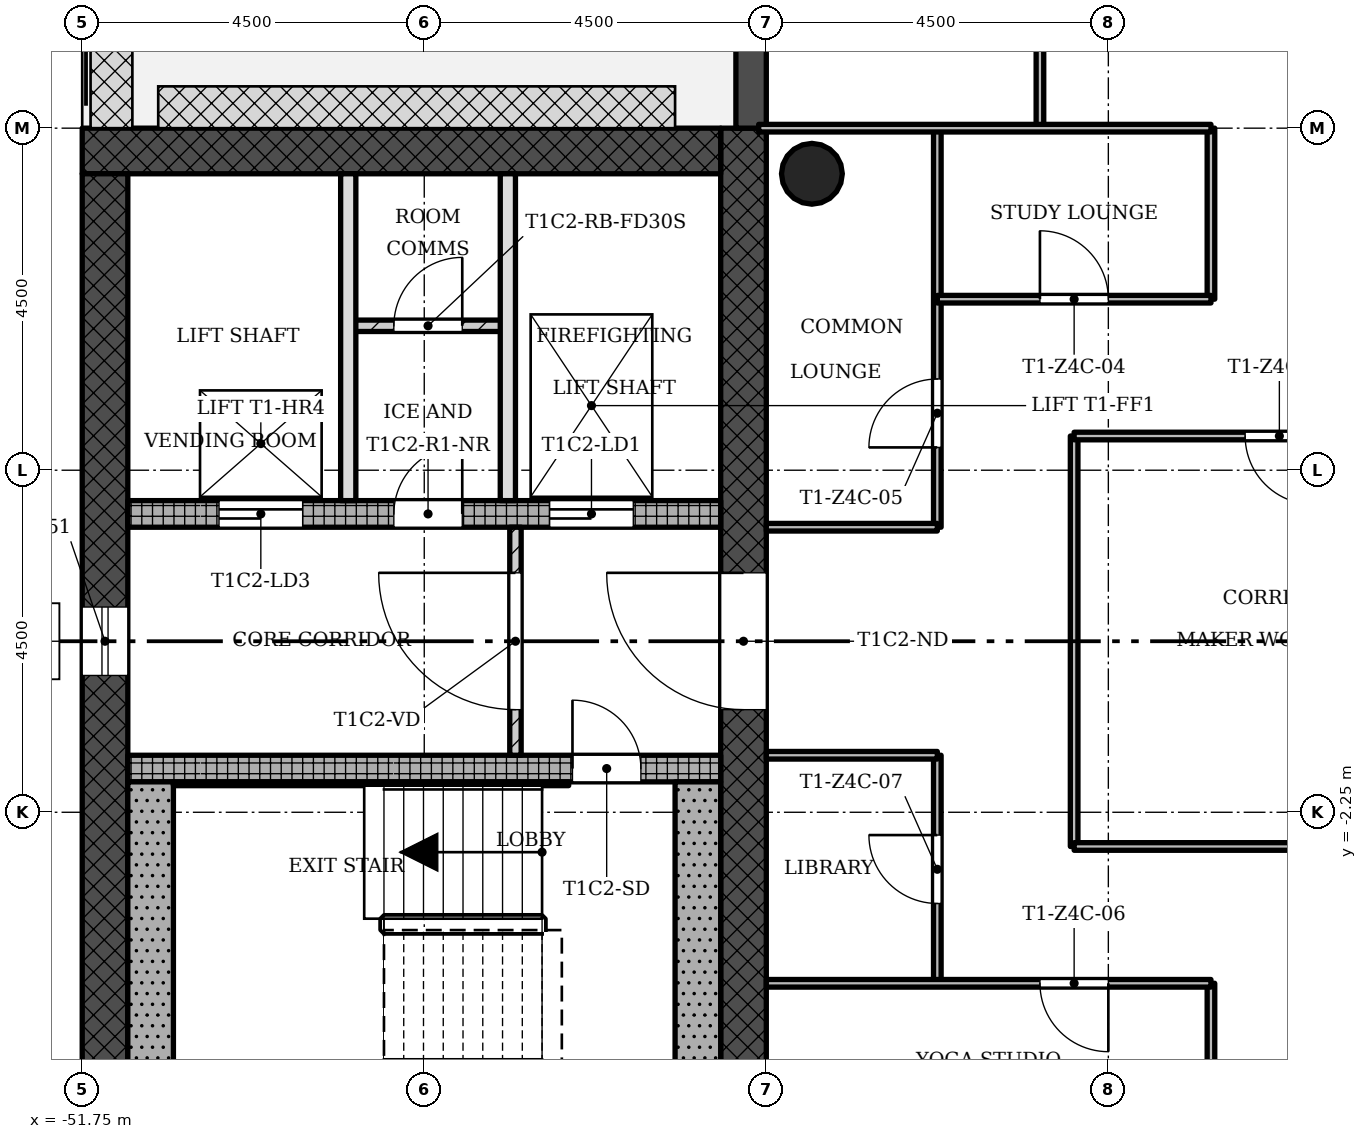
"""IFC4 building model, lengths in metres.
Left out: names, types, materials, properties, quantities, classifications, styles, units other than length and angle.
Written with IfcOpenShell. Run it as: python <this file> out.ifc"""

import sys

from ifc_helpers import new_model, si_unit, direction, frame, frame_2d, origin, origin_2d, place, context, subcontext, project, spatial, rectangle, hollow_circle, extrude, element, fill, save


model = new_model("IFC4")
c1 = context("Model", 3, precision=1e-05, world=origin(), true_north=direction((0.0, 1.0)))
c2 = subcontext(c1, "Body", "Model", "MODEL_VIEW")
j1 = project(units=[si_unit("LENGTHUNIT", "METRE"), si_unit("PLANEANGLEUNIT", "RADIAN")], contexts=[c1])
p1 = place(None, origin())
s1 = spatial("IfcSite", under=j1, at=p1, CompositionType="ELEMENT")
p2 = place(p1, origin())
s2 = spatial("IfcBuilding", under=s1, at=p2, CompositionType="ELEMENT")
p3 = place(p2, frame((0.0, 0.0, 185.8)))
s3 = spatial("IfcBuildingStorey", under=s2, at=p3, CompositionType="ELEMENT", Elevation=185.8)
p4 = place(p3, frame((-43.05, -6.15, 0.0), z_axis=(0.0, 0.0, 1.0), x_axis=(0.0, 1.0, 0.0)))
e1 = element("IfcWall", 1, at=p4, inside=s3, PredefinedType="SHEAR", context=c2, shape_type="SweptSolid", body=[
    extrude(rectangle(XDim=12.9, YDim=0.6, at=frame_2d((6.45, 0.0))), origin(), (0.0, 0.0, 1.0), 3.4),
])
p5 = place(p4, frame((5.25, 0.0, 0.0)))
e2 = element("IfcOpeningElement", 2, at=p5, cuts=e1, PredefinedType="OPENING", context=c2, shape_type="SweptSolid", body=[
    extrude(rectangle(XDim=1.8, YDim=2.1, at=frame_2d((0.9, 1.05))), frame((0.0, 0.31, 0.0), z_axis=(0.0, -1.0, 0.0), x_axis=(1.0, 0.0, 0.0)), (0.0, 0.0, 1.0), 0.62),
])
p6 = place(p3, frame((-43.35, 6.45, 0.0), z_axis=(0.0, 0.0, 1.0), x_axis=(-1.0, 0.0, 0.0)))
e3 = element("IfcWall", 3, at=p6, inside=s3, PredefinedType="SHEAR", context=c2, shape_type="SweptSolid", body=[
    extrude(rectangle(XDim=8.4, YDim=0.6, at=frame_2d((4.2, 0.0))), origin(), (0.0, 0.0, 1.0), 3.4),
])
p7 = place(p3, frame((-51.45, 6.15, 0.0), z_axis=(0.0, 0.0, 1.0), x_axis=(0.0, -1.0, 0.0)))
e4 = element("IfcWall", 4, at=p7, inside=s3, PredefinedType="SHEAR", context=c2, shape_type="SweptSolid", body=[
    extrude(rectangle(XDim=12.9, YDim=0.6, at=frame_2d((6.45, 0.0))), origin(), (0.0, 0.0, 1.0), 3.4),
])
p8 = place(p7, frame((5.7, 0.0, 0.45)))
e5 = element("IfcOpeningElement", 5, at=p8, cuts=e4, PredefinedType="OPENING", context=c2, shape_type="SweptSolid", body=[
    extrude(rectangle(XDim=0.9, YDim=2.4, at=frame_2d((0.45, 1.2))), frame((0.0, 0.31, 0.0), z_axis=(0.0, -1.0, 0.0), x_axis=(1.0, 0.0, 0.0)), (0.0, 0.0, 1.0), 0.62),
])
p9 = place(p3, frame((-51.15, -1.675, 0.0), z_axis=(0.0, 0.0, 1.0), x_axis=(1.0, 0.0, 0.0)))
e6 = element("IfcWall", 6, at=p9, inside=s3, PredefinedType="SHEAR", context=c2, shape_type="SweptSolid", body=[
    extrude(rectangle(XDim=7.8, YDim=0.35, at=frame_2d((3.9, 0.0))), origin(), (0.0, 0.0, 1.0), 3.4),
])
p10 = place(p9, frame((5.85, 0.0, 0.0)))
e7 = element("IfcOpeningElement", 7, at=p10, cuts=e6, PredefinedType="OPENING", context=c2, shape_type="SweptSolid", body=[
    extrude(rectangle(XDim=0.9, YDim=2.1, at=frame_2d((0.45, 1.05))), frame((0.0, 0.185, 0.0), z_axis=(0.0, -1.0, 0.0), x_axis=(1.0, 0.0, 0.0)), (0.0, 0.0, 1.0), 0.37),
])
p11 = place(p3, frame((-51.15, 1.675, 0.0), z_axis=(0.0, 0.0, 1.0), x_axis=(1.0, 0.0, 0.0)))
e8 = element("IfcWall", 8, at=p11, inside=s3, PredefinedType="SHEAR", context=c2, shape_type="SweptSolid", body=[
    extrude(rectangle(XDim=7.8, YDim=0.35, at=frame_2d((3.9, 0.0))), origin(), (0.0, 0.0, 1.0), 3.4),
])
p12 = place(p11, frame((5.55, 0.0, 0.0)))
e9 = element("IfcOpeningElement", 9, at=p12, cuts=e8, PredefinedType="OPENING", context=c2, shape_type="SweptSolid", body=[
    extrude(rectangle(XDim=1.1, YDim=2.1, at=frame_2d((0.55, 1.05))), frame((0.0, 0.185, 0.0), z_axis=(0.0, -1.0, 0.0), x_axis=(1.0, 0.0, 0.0)), (0.0, 0.0, 1.0), 0.37),
])
p13 = place(p11, frame((1.2, 0.0, 0.0)))
e10 = element("IfcOpeningElement", 10, at=p13, cuts=e8, PredefinedType="OPENING", context=c2, shape_type="SweptSolid", body=[
    extrude(rectangle(XDim=1.1, YDim=2.1, at=frame_2d((0.55, 1.05))), frame((0.0, 0.185, 0.0), z_axis=(0.0, -1.0, 0.0), x_axis=(1.0, 0.0, 0.0)), (0.0, 0.0, 1.0), 0.37),
])
p14 = place(p11, frame((3.5, 0.0, 0.0)))
e11 = element("IfcOpeningElement", 11, at=p14, cuts=e8, PredefinedType="OPENING", context=c2, shape_type="SweptSolid", body=[
    extrude(rectangle(XDim=0.9, YDim=2.1, at=frame_2d((0.45, 1.05))), frame((0.0, 0.185, 0.0), z_axis=(0.0, -1.0, 0.0), x_axis=(1.0, 0.0, 0.0)), (0.0, 0.0, 1.0), 0.37),
])
p15 = place(p3, frame((-42.15, 6.15, 0.0), z_axis=(0.0, 0.0, 1.0), x_axis=(1.0, 0.0, 0.0)))
e12 = element("IfcColumn", 12, at=p15, inside=s3, PredefinedType="COLUMN", context=c2, shape_type="SweptSolid", body=[
    extrude(hollow_circle(Radius=0.4, WallThickness=0.028, at=origin_2d()), origin(), (0.0, 0.0, 1.0), 3.4),
])
p16 = place(p3, frame((-42.95, 11.25, -0.02), z_axis=(0.0, 0.0, 1.0), x_axis=(0.0, -1.0, 0.0)))
e13 = element("IfcWall", 13, at=p16, inside=s3, PredefinedType="STANDARD", context=c2, shape_type="SweptSolid", body=[
    extrude(rectangle(XDim=4.5, YDim=0.4, at=frame_2d((2.25, 0.0))), origin(), (0.0, 0.0, 1.0), 3.12),
])
p17 = place(p16, frame((1.35, 0.0, 0.02)))
e14 = element("IfcOpeningElement", 14, at=p17, cuts=e13, PredefinedType="OPENING", context=c2, shape_type="SweptSolid", body=[
    extrude(rectangle(XDim=1.8, YDim=2.1, at=frame_2d((0.9, 1.05))), frame((0.0, 0.21, 0.0), z_axis=(0.0, -1.0, 0.0), x_axis=(1.0, 0.0, 0.0)), (0.0, 0.0, 1.0), 0.42),
])
p18 = place(p3, frame((-46.05, 1.5, 0.0), z_axis=(0.0, 0.0, 1.0), x_axis=(0.0, -1.0, 0.0)))
e15 = element("IfcWall", 15, at=p18, inside=s3, PredefinedType="PARTITIONING", context=c2, shape_type="SweptSolid", body=[
    extrude(rectangle(XDim=3.0, YDim=0.15, at=frame_2d((1.5, 0.0))), origin(), (0.0, 0.0, 1.0), 3.0),
])
p19 = place(p18, frame((0.6, 0.0, 0.0)))
e16 = element("IfcOpeningElement", 16, at=p19, cuts=e15, PredefinedType="OPENING", context=c2, shape_type="SweptSolid", body=[
    extrude(rectangle(XDim=1.8, YDim=2.1, at=frame_2d((0.9, 1.05))), frame((0.0, 0.085, 0.0), z_axis=(0.0, -1.0, 0.0), x_axis=(1.0, 0.0, 0.0)), (0.0, 0.0, 1.0), 0.17),
])
for number, where, z_axis, x_axis in (
    (17, (-48.25, 6.15, 0.0), (0.0, 0.0, 1.0), (0.0, -1.0, 0.0)),
    (18, (-46.15, 6.15, 0.0), (0.0, 0.0, 1.0), (0.0, -1.0, 0.0)),
):
    element("IfcWall", number, at=place(p3, frame(where, z_axis=z_axis, x_axis=x_axis)), inside=s3, PredefinedType="SOLIDWALL", context=c2, shape_type="SweptSolid", body=[
        extrude(rectangle(XDim=4.3, YDim=0.2, at=frame_2d((2.15, 0.0))), origin(), (0.0, 0.0, 1.0), 3.0),
    ])
p20 = place(p3, frame((-46.15, 4.15, 0.0), z_axis=(0.0, 0.0, 1.0), x_axis=(-1.0, 0.0, 0.0)))
e19 = element("IfcWall", 19, at=p20, inside=s3, PredefinedType="PARTITIONING", context=c2, shape_type="SweptSolid", body=[
    extrude(rectangle(XDim=2.1, YDim=0.15, at=frame_2d((1.05, 0.0))), origin(), (0.0, 0.0, 1.0), 3.0),
])
p21 = place(p20, frame((0.6, 0.0, 0.0)))
e20 = element("IfcOpeningElement", 20, at=p21, cuts=e19, PredefinedType="OPENING", context=c2, shape_type="SweptSolid", body=[
    extrude(rectangle(XDim=0.9, YDim=2.1, at=frame_2d((0.45, 1.05))), frame((0.0, 0.085, 0.0), z_axis=(0.0, -1.0, 0.0), x_axis=(1.0, 0.0, 0.0)), (0.0, 0.0, 1.0), 0.17),
])
p22 = place(p3, frame((-40.5, -4.5, 0.0), z_axis=(0.0, 0.0, 1.0), x_axis=(0.0, 1.0, 0.0)))
e21 = element("IfcWall", 21, at=p22, inside=s3, PredefinedType="PARTITIONING", context=c2, shape_type="SweptSolid", body=[
    extrude(rectangle(XDim=3.0, YDim=0.1, at=frame_2d((1.5, 0.0))), origin(), (0.0, 0.0, 1.0), 3.0),
])
p23 = place(p22, frame((1.05, 0.0, 0.0)))
e22 = element("IfcOpeningElement", 22, at=p23, cuts=e21, PredefinedType="OPENING", context=c2, shape_type="SweptSolid", body=[
    extrude(rectangle(XDim=0.9, YDim=2.1, at=frame_2d((0.45, 1.05))), frame((0.0, 0.06, 0.0), z_axis=(0.0, -1.0, 0.0), x_axis=(1.0, 0.0, 0.0)), (0.0, 0.0, 1.0), 0.12),
])
p24 = place(p3, frame((-40.5, 1.5, 0.0), z_axis=(0.0, 0.0, 1.0), x_axis=(0.0, 1.0, 0.0)))
e23 = element("IfcWall", 23, at=p24, inside=s3, PredefinedType="PARTITIONING", context=c2, shape_type="SweptSolid", body=[
    extrude(rectangle(XDim=5.25, YDim=0.1, at=frame_2d((2.625, 0.0))), origin(), (0.0, 0.0, 1.0), 3.0),
])
p25 = place(p24, frame((1.05, 0.0, 0.0)))
e24 = element("IfcOpeningElement", 24, at=p25, cuts=e23, PredefinedType="OPENING", context=c2, shape_type="SweptSolid", body=[
    extrude(rectangle(XDim=0.9, YDim=2.1, at=frame_2d((0.45, 1.05))), frame((0.0, 0.06, 0.0), z_axis=(0.0, -1.0, 0.0), x_axis=(1.0, 0.0, 0.0)), (0.0, 0.0, 1.0), 0.12),
])
p26 = place(p3, frame((-39.15, 6.75, 0.0), z_axis=(0.0, 0.0, 1.0), x_axis=(0.0, 1.0, 0.0)))
e25 = element("IfcWall", 25, at=p26, inside=s3, PredefinedType="PARTITIONING", context=c2, shape_type="SweptSolid", body=[
    extrude(rectangle(XDim=4.5, YDim=0.1, at=frame_2d((2.25, 0.0))), origin(), (0.0, 0.0, 1.0), 3.0),
])
p27 = place(p26, frame((1.8, 0.0, 0.0)))
e26 = element("IfcOpeningElement", 26, at=p27, cuts=e25, PredefinedType="OPENING", context=c2, shape_type="SweptSolid", body=[
    extrude(rectangle(XDim=0.9, YDim=2.1, at=frame_2d((0.45, 1.05))), frame((0.0, 0.06, 0.0), z_axis=(0.0, -1.0, 0.0), x_axis=(1.0, 0.0, 0.0)), (0.0, 0.0, 1.0), 0.12),
])
p28 = place(p3, frame((-38.7, -2.7, 0.0), z_axis=(0.0, 0.0, 1.0), x_axis=(0.0, 1.0, 0.0)))
e27 = element("IfcWall", 27, at=p28, inside=s3, PredefinedType="PARTITIONING", context=c2, shape_type="SweptSolid", body=[
    extrude(rectangle(XDim=5.4, YDim=0.1, at=frame_2d((2.7, 0.0))), origin(), (0.0, 0.0, 1.0), 3.0),
])
p29 = place(p3, frame((-36.9, -11.25, 0.0), z_axis=(0.0, 0.0, 1.0), x_axis=(0.0, 1.0, 0.0)))
e28 = element("IfcWall", 28, at=p29, inside=s3, PredefinedType="PARTITIONING", context=c2, shape_type="SweptSolid", body=[
    extrude(rectangle(XDim=6.75, YDim=0.1, at=frame_2d((3.375, 0.0))), origin(), (0.0, 0.0, 1.0), 3.0),
])
p30 = place(p29, frame((1.8, 0.0, 0.0)))
e29 = element("IfcOpeningElement", 29, at=p30, cuts=e28, PredefinedType="OPENING", context=c2, shape_type="SweptSolid", body=[
    extrude(rectangle(XDim=0.9, YDim=2.1, at=frame_2d((0.45, 1.05))), frame((0.0, 0.06, 0.0), z_axis=(0.0, -1.0, 0.0), x_axis=(1.0, 0.0, 0.0)), (0.0, 0.0, 1.0), 0.12),
])
p31 = place(p3, frame((-36.9, 4.5, 0.0), z_axis=(0.0, 0.0, 1.0), x_axis=(0.0, 1.0, 0.0)))
e30 = element("IfcWall", 30, at=p31, inside=s3, PredefinedType="PARTITIONING", context=c2, shape_type="SweptSolid", body=[
    extrude(rectangle(XDim=2.25, YDim=0.1, at=frame_2d((1.125, 0.0))), origin(), (0.0, 0.0, 1.0), 3.0),
])
p32 = place(p3, frame((-42.75, -4.5, 0.0), z_axis=(0.0, 0.0, 1.0), x_axis=(1.0, 0.0, 0.0)))
e31 = element("IfcWall", 31, at=p32, inside=s3, PredefinedType="PARTITIONING", context=c2, shape_type="SweptSolid", body=[
    extrude(rectangle(XDim=5.85, YDim=0.1, at=frame_2d((2.925, 0.0))), origin(), (0.0, 0.0, 1.0), 3.0),
])
p33 = place(p32, frame((3.6, 0.0, 0.0)))
e32 = element("IfcOpeningElement", 32, at=p33, cuts=e31, PredefinedType="OPENING", context=c2, shape_type="SweptSolid", body=[
    extrude(rectangle(XDim=0.9, YDim=2.1, at=frame_2d((0.45, 1.05))), frame((0.0, 0.06, 0.0), z_axis=(0.0, -1.0, 0.0), x_axis=(1.0, 0.0, 0.0)), (0.0, 0.0, 1.0), 0.12),
])
p34 = place(p3, frame((-38.7, -2.7, 0.0), z_axis=(0.0, 0.0, 1.0), x_axis=(1.0, 0.0, 0.0)))
e33 = element("IfcWall", 33, at=p34, inside=s3, PredefinedType="PARTITIONING", context=c2, shape_type="SweptSolid", body=[
    extrude(rectangle(XDim=5.4, YDim=0.1, at=frame_2d((2.7, 0.0))), origin(), (0.0, 0.0, 1.0), 3.0),
])
for number, where, z_axis, x_axis in (
    (34, (-42.75, -1.5, 0.0), (0.0, 0.0, 1.0), (1.0, 0.0, 0.0)),
    (35, (-42.75, 1.5, 0.0), (0.0, 0.0, 1.0), (1.0, 0.0, 0.0)),
):
    element("IfcWall", number, at=place(p3, frame(where, z_axis=z_axis, x_axis=x_axis)), inside=s3, PredefinedType="PARTITIONING", context=c2, shape_type="SweptSolid", body=[
        extrude(rectangle(XDim=2.25, YDim=0.1, at=frame_2d((1.125, 0.0))), origin(), (0.0, 0.0, 1.0), 3.0),
    ])
p35 = place(p3, frame((-38.7, 2.7, 0.0), z_axis=(0.0, 0.0, 1.0), x_axis=(1.0, 0.0, 0.0)))
e36 = element("IfcWall", 36, at=p35, inside=s3, PredefinedType="PARTITIONING", context=c2, shape_type="SweptSolid", body=[
    extrude(rectangle(XDim=5.4, YDim=0.1, at=frame_2d((2.7, 0.0))), origin(), (0.0, 0.0, 1.0), 3.0),
])
p36 = place(p35, frame((2.25, 0.0, 0.0)))
e37 = element("IfcOpeningElement", 37, at=p36, cuts=e36, PredefinedType="OPENING", context=c2, shape_type="SweptSolid", body=[
    extrude(rectangle(XDim=0.9, YDim=2.1, at=frame_2d((0.45, 1.05))), frame((0.0, 0.06, 0.0), z_axis=(0.0, -1.0, 0.0), x_axis=(1.0, 0.0, 0.0)), (0.0, 0.0, 1.0), 0.12),
])
p37 = place(p3, frame((-40.5, 4.5, 0.0), z_axis=(0.0, 0.0, 1.0), x_axis=(1.0, 0.0, 0.0)))
e38 = element("IfcWall", 38, at=p37, inside=s3, PredefinedType="PARTITIONING", context=c2, shape_type="SweptSolid", body=[
    extrude(rectangle(XDim=3.6, YDim=0.1, at=frame_2d((1.8, 0.0))), origin(), (0.0, 0.0, 1.0), 3.0),
])
p38 = place(p37, frame((1.35, 0.0, 0.0)))
e39 = element("IfcOpeningElement", 39, at=p38, cuts=e38, PredefinedType="OPENING", context=c2, shape_type="SweptSolid", body=[
    extrude(rectangle(XDim=0.9, YDim=2.1, at=frame_2d((0.45, 1.05))), frame((0.0, 0.06, 0.0), z_axis=(0.0, -1.0, 0.0), x_axis=(1.0, 0.0, 0.0)), (0.0, 0.0, 1.0), 0.12),
])
p39 = place(p3, frame((-42.85, 6.75, 0.0), z_axis=(0.0, 0.0, 1.0), x_axis=(1.0, 0.0, 0.0)))
e40 = element("IfcWall", 40, at=p39, inside=s3, PredefinedType="PARTITIONING", context=c2, shape_type="SweptSolid", body=[
    extrude(rectangle(XDim=5.95, YDim=0.1, at=frame_2d((2.975, 0.0))), origin(), (0.0, 0.0, 1.0), 3.0),
])
for number, where, z_axis, x_axis in (
    (41, (-50.85, -1.85, 0.0), (0.0, 0.0, 1.0), (0.0, -1.0, 0.0)),
    (42, (-43.65, -1.85, 0.0), (0.0, 0.0, 1.0), (0.0, -1.0, 0.0)),
):
    element("IfcWall", number, at=place(p3, frame(where, z_axis=z_axis, x_axis=x_axis)), inside=s3, PredefinedType="SHEAR", context=c2, shape_type="SweptSolid", body=[
        extrude(rectangle(XDim=4.3, YDim=0.6, at=frame_2d((2.15, 0.0))), origin(), (0.0, 0.0, 1.0), 3.4),
    ])
p40 = place(p3, frame((-45.35, -1.875, 0.0), z_axis=(0.0, 0.0, 1.0), x_axis=(-1.0, 0.0, 0.0)))
e43 = element("IfcWall", 43, at=p40, inside=s3, PredefinedType="SHEAR", context=c2, shape_type="SweptSolid", body=[
    extrude(rectangle(XDim=5.2, YDim=0.05, at=frame_2d((2.6, 0.0))), origin(), (0.0, 0.0, 1.0), 3.4),
])
p41 = place(p8, origin())
e44 = element("IfcWindow", 44, at=p41, inside=s3, PartitioningType="SINGLE_PANEL", PredefinedType="WINDOW", context=c2, shape_type="SweptSolid", body=[
    extrude(rectangle(XDim=0.9, YDim=2.4, at=frame_2d((0.45, 1.2))), frame((0.0, 0.03, 0.0), z_axis=(0.0, -1.0, 0.0), x_axis=(1.0, 0.0, 0.0)), (0.0, 0.0, 1.0), 0.06),
])
fill(e5, e44)
p42 = place(p19, origin())
e45 = element("IfcDoor", 45, at=p42, inside=s3, OperationType="SINGLE_SWING_LEFT", PredefinedType="DOOR", context=c2, shape_type="SweptSolid", body=[
    extrude(rectangle(XDim=1.8, YDim=2.1, at=frame_2d((0.9, 1.05))), frame((0.0, 0.025, 0.0), z_axis=(0.0, -1.0, 0.0), x_axis=(1.0, 0.0, 0.0)), (0.0, 0.0, 1.0), 0.05),
])
fill(e16, e45)
p43 = place(p21, origin())
e46 = element("IfcDoor", 46, at=p43, inside=s3, OperationType="SINGLE_SWING_LEFT", PredefinedType="DOOR", context=c2, shape_type="SweptSolid", body=[
    extrude(rectangle(XDim=0.9, YDim=2.1, at=frame_2d((0.45, 1.05))), frame((0.0, 0.025, 0.0), z_axis=(0.0, -1.0, 0.0), x_axis=(1.0, 0.0, 0.0)), (0.0, 0.0, 1.0), 0.05),
])
fill(e20, e46)
p44 = place(p36, origin())
e47 = element("IfcDoor", 47, at=p44, inside=s3, OperationType="SINGLE_SWING_RIGHT", PredefinedType="DOOR", context=c2, shape_type="SweptSolid", body=[
    extrude(rectangle(XDim=0.9, YDim=2.1, at=frame_2d((0.45, 1.05))), frame((0.0, 0.025, 0.0), z_axis=(0.0, -1.0, 0.0), x_axis=(1.0, 0.0, 0.0)), (0.0, 0.0, 1.0), 0.05),
])
fill(e37, e47)
p45 = place(p38, origin())
e48 = element("IfcDoor", 48, at=p45, inside=s3, OperationType="SINGLE_SWING_RIGHT", PredefinedType="DOOR", context=c2, shape_type="SweptSolid", body=[
    extrude(rectangle(XDim=0.9, YDim=2.1, at=frame_2d((0.45, 1.05))), frame((0.0, 0.025, 0.0), z_axis=(0.0, -1.0, 0.0), x_axis=(1.0, 0.0, 0.0)), (0.0, 0.0, 1.0), 0.05),
])
fill(e39, e48)
p46 = place(p25, origin())
e49 = element("IfcDoor", 49, at=p46, inside=s3, OperationType="SINGLE_SWING_RIGHT", PredefinedType="DOOR", context=c2, shape_type="SweptSolid", body=[
    extrude(rectangle(XDim=0.9, YDim=2.1, at=frame_2d((0.45, 1.05))), frame((0.0, 0.025, 0.0), z_axis=(0.0, -1.0, 0.0), x_axis=(1.0, 0.0, 0.0)), (0.0, 0.0, 1.0), 0.05),
])
fill(e24, e49)
p47 = place(p33, origin())
e50 = element("IfcDoor", 50, at=p47, inside=s3, OperationType="SINGLE_SWING_RIGHT", PredefinedType="DOOR", context=c2, shape_type="SweptSolid", body=[
    extrude(rectangle(XDim=0.9, YDim=2.1, at=frame_2d((0.45, 1.05))), frame((0.0, 0.025, 0.0), z_axis=(0.0, -1.0, 0.0), x_axis=(1.0, 0.0, 0.0)), (0.0, 0.0, 1.0), 0.05),
])
fill(e32, e50)
p48 = place(p23, origin())
e51 = element("IfcDoor", 51, at=p48, inside=s3, OperationType="SINGLE_SWING_LEFT", PredefinedType="DOOR", context=c2, shape_type="SweptSolid", body=[
    extrude(rectangle(XDim=0.9, YDim=2.1, at=frame_2d((0.45, 1.05))), frame((0.0, 0.025, 0.0), z_axis=(0.0, -1.0, 0.0), x_axis=(1.0, 0.0, 0.0)), (0.0, 0.0, 1.0), 0.05),
])
fill(e22, e51)
p49 = place(p10, origin())
e52 = element("IfcDoor", 52, at=p49, inside=s3, OperationType="SINGLE_SWING_RIGHT", PredefinedType="DOOR", context=c2, shape_type="SweptSolid", body=[
    extrude(rectangle(XDim=0.9, YDim=2.1, at=frame_2d((0.45, 1.05))), frame((0.0, 0.025, 0.0), z_axis=(0.0, -1.0, 0.0), x_axis=(1.0, 0.0, 0.0)), (0.0, 0.0, 1.0), 0.05),
])
fill(e7, e52)
p50 = place(p12, origin())
e53 = element("IfcDoor", 53, at=p50, inside=s3, OperationType="SLIDING_TO_LEFT", PredefinedType="DOOR", context=c2, shape_type="SweptSolid", body=[
    extrude(rectangle(XDim=1.1, YDim=2.1, at=frame_2d((0.55, 1.05))), frame((0.0, 0.025, 0.0), z_axis=(0.0, -1.0, 0.0), x_axis=(1.0, 0.0, 0.0)), (0.0, 0.0, 1.0), 0.05),
])
fill(e9, e53)
p51 = place(p13, origin())
e54 = element("IfcDoor", 54, at=p51, inside=s3, OperationType="SLIDING_TO_LEFT", PredefinedType="DOOR", context=c2, shape_type="SweptSolid", body=[
    extrude(rectangle(XDim=1.1, YDim=2.1, at=frame_2d((0.55, 1.05))), frame((0.0, 0.025, 0.0), z_axis=(0.0, -1.0, 0.0), x_axis=(1.0, 0.0, 0.0)), (0.0, 0.0, 1.0), 0.05),
])
fill(e10, e54)
p52 = place(p14, origin())
e55 = element("IfcDoor", 55, at=p52, inside=s3, OperationType="SINGLE_SWING_LEFT", PredefinedType="DOOR", context=c2, shape_type="SweptSolid", body=[
    extrude(rectangle(XDim=0.9, YDim=2.1, at=frame_2d((0.45, 1.05))), frame((0.0, 0.025, 0.0), z_axis=(0.0, -1.0, 0.0), x_axis=(1.0, 0.0, 0.0)), (0.0, 0.0, 1.0), 0.05),
])
fill(e11, e55)
p53 = place(p5, origin())
e56 = element("IfcDoor", 56, at=p53, inside=s3, OperationType="SINGLE_SWING_LEFT", PredefinedType="DOOR", context=c2, shape_type="SweptSolid", body=[
    extrude(rectangle(XDim=1.8, YDim=2.1, at=frame_2d((0.9, 1.05))), frame((0.0, 0.025, 0.0), z_axis=(0.0, -1.0, 0.0), x_axis=(1.0, 0.0, 0.0)), (0.0, 0.0, 1.0), 0.05),
])
fill(e2, e56)
save(model, sys.argv[1])
